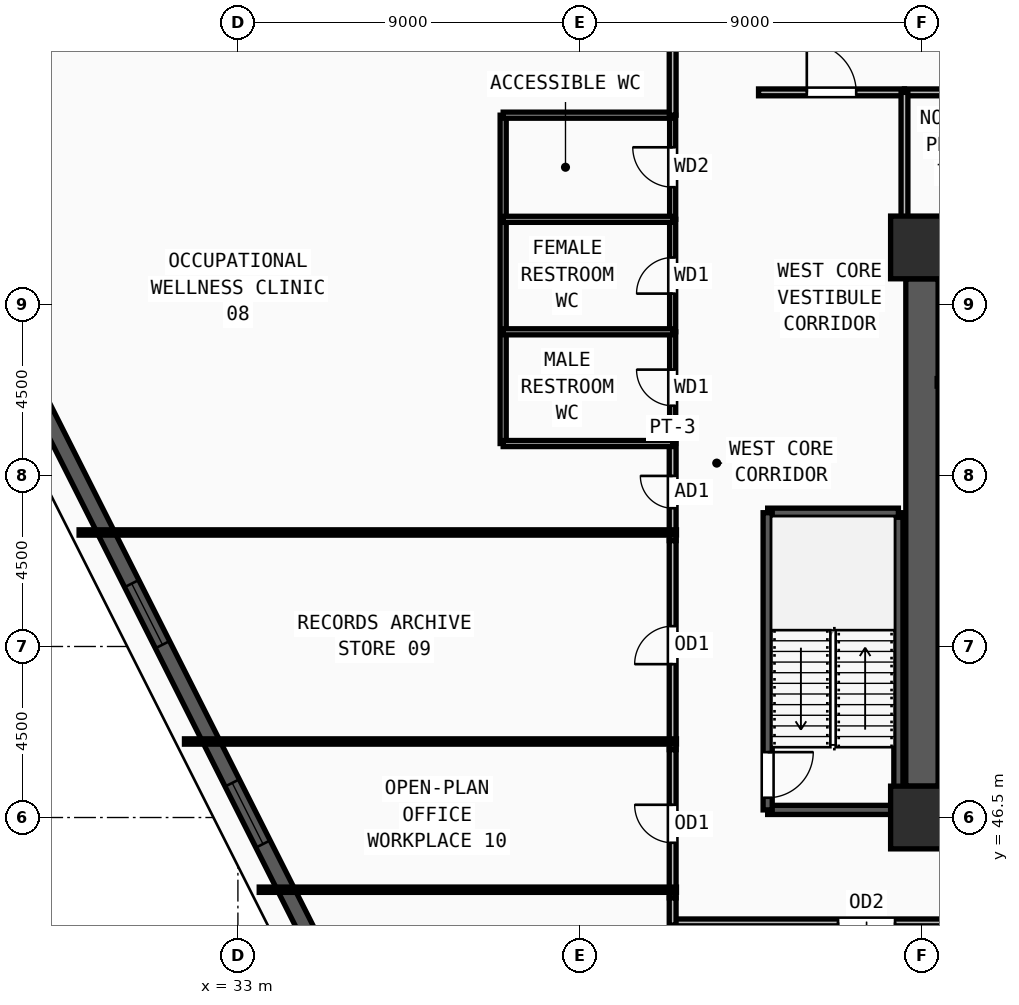
"""IFC4 building model, lengths in metres.
Left out: names, types, materials, properties, quantities, classifications, styles, units other than length and angle.
Written with IfcOpenShell. Run it as: python <this file> out.ifc"""

import sys

from ifc_helpers import new_model, si_unit, direction, frame, frame_2d, origin, origin_2d, place, context, subcontext, project, spatial, rectangle, extrude, source, transform, mapped, element, fill, save


model = new_model("IFC4")
c1 = context("Model", 3, precision=1e-05, world=origin(), true_north=direction((0.0, 1.0)))
c2 = subcontext(c1, "Body", "Model", "MODEL_VIEW")
j1 = project(units=[si_unit("LENGTHUNIT", "METRE"), si_unit("PLANEANGLEUNIT", "RADIAN")], contexts=[c1])
p1 = place(None, origin())
s1 = spatial("IfcSite", under=j1, at=p1, CompositionType="ELEMENT")
p2 = place(p1, origin())
s2 = spatial("IfcBuilding", under=s1, at=p2, CompositionType="ELEMENT")
p3 = place(p2, frame((0.0, 0.0, 74.25)))
s3 = spatial("IfcBuildingStorey", under=s2, at=p3, CompositionType="ELEMENT", Elevation=74.25)
m1 = source(origin(), c2, "Body", "SweptSolid", [
    extrude(rectangle(XDim=1.65, YDim=1.65, at=origin_2d()), origin(), (0.0, 0.0, 1.0), 3.75),
])
for number, where, z_axis, x_axis in (
    (1, (51.0, 46.5, 0.0), (0.0, 0.0, 1.0), (1.0, 0.0, 0.0)),
    (2, (51.0, 61.5, 0.0), (0.0, 0.0, 1.0), (1.0, 0.0, 0.0)),
):
    element("IfcColumn", number, at=place(p3, frame(where, z_axis=z_axis, x_axis=x_axis)), inside=s3, PredefinedType="COLUMN", context=c2, shape_type="MappedRepresentation", body=[
        mapped(m1, transform((0.0, 0.0, 0.0), x_axis=(1.0, 0.0, 0.0), y_axis=(0.0, 1.0, 0.0), z_axis=(0.0, 0.0, 1.0), scale=1.0)),
    ])
p4 = place(p3, frame((22.462, 68.01, 0.0), z_axis=(0.0, 0.0, 1.0), x_axis=(0.450259201953, -0.89289789509, 0.0)))
e3 = element("IfcWall", 3, at=p4, inside=s3, PredefinedType="SOLIDWALL", context=c2, shape_type="SweptSolid", body=[
    extrude(rectangle(XDim=33.094, YDim=0.42, at=frame_2d((16.547, 0.0))), origin(), (0.0, 0.0, 1.0), 3.57),
])
m2 = source(origin(), c2, "Body", "SweptSolid", [
    extrude(rectangle(XDim=1.8, YDim=1.95, at=frame_2d((0.9, 0.975))), frame((0.0, 0.22, 0.0), z_axis=(0.0, -1.0, 0.0), x_axis=(1.0, 0.0, 0.0)), (0.0, 0.0, 1.0), 0.44),
])
p5 = place(p4, frame((7.374, 0.0, 0.55)))
e4 = element("IfcOpeningElement", 4, at=p5, cuts=e3, PredefinedType="OPENING", context=c2, shape_type="MappedRepresentation", body=[
    mapped(m2, transform((0.0, 0.0, 0.0), x_axis=(1.0, 0.0, 0.0), y_axis=(0.0, 1.0, 0.0), z_axis=(0.0, 0.0, 1.0), scale=1.0)),
])
p6 = place(p4, frame((17.197, 0.0, 0.55)))
e5 = element("IfcOpeningElement", 5, at=p6, cuts=e3, PredefinedType="OPENING", context=c2, shape_type="MappedRepresentation", body=[
    mapped(m2, transform((0.0, 0.0, 0.0), x_axis=(1.0, 0.0, 0.0), y_axis=(0.0, 1.0, 0.0), z_axis=(0.0, 0.0, 1.0), scale=1.0)),
])
p7 = place(p4, frame((23.071, 0.0, 0.55)))
e6 = element("IfcOpeningElement", 6, at=p7, cuts=e3, PredefinedType="OPENING", context=c2, shape_type="MappedRepresentation", body=[
    mapped(m2, transform((0.0, 0.0, 0.0), x_axis=(1.0, 0.0, 0.0), y_axis=(0.0, 1.0, 0.0), z_axis=(0.0, 0.0, 1.0), scale=1.0)),
])
p8 = place(p3, frame((51.0, 47.325, 0.0), z_axis=(0.0, 0.0, 1.0), x_axis=(0.0, 1.0, 0.0)))
e7 = element("IfcWall", 7, at=p8, inside=s3, PredefinedType="SHEAR", context=c2, shape_type="SweptSolid", body=[
    extrude(rectangle(XDim=13.35, YDim=0.85, at=frame_2d((6.675, 0.0))), origin(), (0.0, 0.0, 1.0), 3.57),
])
p9 = place(p3, frame((46.94, 46.7, 0.0), z_axis=(0.0, 0.0, 1.0), x_axis=(1.0, 0.0, 0.0)))
e8 = element("IfcWall", 8, at=p9, inside=s3, PredefinedType="SOLIDWALL", context=c2, shape_type="SweptSolid", body=[
    extrude(rectangle(XDim=3.44, YDim=0.24, at=frame_2d((1.72, 0.0))), origin(), (0.0, 0.0, 1.0), 3.57),
])
p10 = place(p3, frame((50.38, 46.7, 0.0), z_axis=(0.0, 0.0, 1.0), x_axis=(0.0, 1.0, 0.0)))
e9 = element("IfcWall", 9, at=p10, inside=s3, PredefinedType="SOLIDWALL", context=c2, shape_type="SweptSolid", body=[
    extrude(rectangle(XDim=7.82, YDim=0.24, at=frame_2d((3.91, 0.0))), origin(), (0.0, 0.0, 1.0), 3.57),
])
p11 = place(p3, frame((50.38, 54.52, 0.0), z_axis=(0.0, 0.0, 1.0), x_axis=(-1.0, 0.0, 0.0)))
e10 = element("IfcWall", 10, at=p11, inside=s3, PredefinedType="SOLIDWALL", context=c2, shape_type="SweptSolid", body=[
    extrude(rectangle(XDim=3.44, YDim=0.24, at=frame_2d((1.72, 0.0))), origin(), (0.0, 0.0, 1.0), 3.57),
])
p12 = place(p3, frame((46.94, 54.52, 0.0), z_axis=(0.0, 0.0, 1.0), x_axis=(0.0, -1.0, 0.0)))
e11 = element("IfcWall", 11, at=p12, inside=s3, PredefinedType="SOLIDWALL", context=c2, shape_type="SweptSolid", body=[
    extrude(rectangle(XDim=7.82, YDim=0.24, at=frame_2d((3.91, 0.0))), origin(), (0.0, 0.0, 1.0), 3.57),
])
m3 = source(origin(), c2, "Body", "SweptSolid", [
    extrude(rectangle(XDim=1.2, YDim=2.2, at=frame_2d((0.6, 1.1))), frame((0.0, 0.13, 0.0), z_axis=(0.0, -1.0, 0.0), x_axis=(1.0, 0.0, 0.0)), (0.0, 0.0, 1.0), 0.26),
])
p13 = place(p12, frame((6.3, 0.0, 0.0)))
e12 = element("IfcOpeningElement", 12, at=p13, cuts=e11, PredefinedType="OPENING", context=c2, shape_type="MappedRepresentation", body=[
    mapped(m3, transform((0.0, 0.0, 0.0), x_axis=(1.0, 0.0, 0.0), y_axis=(0.0, 1.0, 0.0), z_axis=(0.0, 0.0, 1.0), scale=1.0)),
])
for number, where, z_axis, x_axis in (
    (13, (51.4, 57.95, 0.0), (0.0, 0.0, 1.0), (1.0, 0.0, 0.0)),
    (14, (53.8, 60.88, 0.0), (0.0, 0.0, 1.0), (-1.0, 0.0, 0.0)),
):
    element("IfcWall", number, at=place(p3, frame(where, z_axis=z_axis, x_axis=x_axis)), inside=s3, PredefinedType="SOLIDWALL", context=c2, shape_type="SweptSolid", body=[
        extrude(rectangle(XDim=2.4, YDim=0.2, at=frame_2d((1.2, 0.0))), origin(), (0.0, 0.0, 1.0), 3.57),
    ])
p14 = place(p3, frame((44.44, 56.34, 0.0), z_axis=(0.0, 0.0, 1.0), x_axis=(0.0, 1.0, 0.0)))
e15 = element("IfcWall", 15, at=p14, inside=s3, PredefinedType="PARTITIONING", context=c2, shape_type="SweptSolid", body=[
    extrude(rectangle(XDim=2.94, YDim=0.16, at=frame_2d((1.47, 0.0))), origin(), (0.0, 0.0, 1.0), 3.57),
])
m4 = source(origin(), c2, "Body", "SweptSolid", [
    extrude(rectangle(XDim=0.95, YDim=2.15, at=frame_2d((0.475, 1.075))), frame((0.0, 0.09, 0.0), z_axis=(0.0, -1.0, 0.0), x_axis=(1.0, 0.0, 0.0)), (0.0, 0.0, 1.0), 0.18),
])
p15 = place(p14, frame((0.995, 0.0, 0.0)))
e16 = element("IfcOpeningElement", 16, at=p15, cuts=e15, PredefinedType="OPENING", context=c2, shape_type="MappedRepresentation", body=[
    mapped(m4, transform((0.0, 0.0, 0.0), x_axis=(1.0, 0.0, 0.0), y_axis=(0.0, 1.0, 0.0), z_axis=(0.0, 0.0, 1.0), scale=1.0)),
])
p16 = place(p3, frame((44.44, 59.28, 0.0), z_axis=(0.0, 0.0, 1.0), x_axis=(0.0, 1.0, 0.0)))
e17 = element("IfcWall", 17, at=p16, inside=s3, PredefinedType="PARTITIONING", context=c2, shape_type="SweptSolid", body=[
    extrude(rectangle(XDim=2.96, YDim=0.16, at=frame_2d((1.48, 0.0))), origin(), (0.0, 0.0, 1.0), 3.57),
])
p17 = place(p16, frame((1.005, 0.0, 0.0)))
e18 = element("IfcOpeningElement", 18, at=p17, cuts=e17, PredefinedType="OPENING", context=c2, shape_type="MappedRepresentation", body=[
    mapped(m4, transform((0.0, 0.0, 0.0), x_axis=(1.0, 0.0, 0.0), y_axis=(0.0, 1.0, 0.0), z_axis=(0.0, 0.0, 1.0), scale=1.0)),
])
p18 = place(p3, frame((44.44, 62.24, 0.0), z_axis=(0.0, 0.0, 1.0), x_axis=(0.0, 1.0, 0.0)))
e19 = element("IfcWall", 19, at=p18, inside=s3, PredefinedType="PARTITIONING", context=c2, shape_type="SweptSolid", body=[
    extrude(rectangle(XDim=2.74, YDim=0.16, at=frame_2d((1.37, 0.0))), origin(), (0.0, 0.0, 1.0), 3.57),
])
m5 = source(origin(), c2, "Body", "SweptSolid", [
    extrude(rectangle(XDim=1.05, YDim=2.15, at=frame_2d((0.525, 1.075))), frame((0.0, 0.09, 0.0), z_axis=(0.0, -1.0, 0.0), x_axis=(1.0, 0.0, 0.0)), (0.0, 0.0, 1.0), 0.18),
])
p19 = place(p18, frame((0.845, 0.0, 0.0)))
e20 = element("IfcOpeningElement", 20, at=p19, cuts=e19, PredefinedType="OPENING", context=c2, shape_type="MappedRepresentation", body=[
    mapped(m5, transform((0.0, 0.0, 0.0), x_axis=(1.0, 0.0, 0.0), y_axis=(0.0, 1.0, 0.0), z_axis=(0.0, 0.0, 1.0), scale=1.0)),
])
p20 = place(p3, frame((50.54, 65.58, 0.0), z_axis=(0.0, 0.0, 1.0), x_axis=(1.0, 0.0, 0.0)))
e21 = element("IfcWall", 21, at=p20, inside=s3, PredefinedType="PARTITIONING", context=c2, shape_type="SweptSolid", body=[
    extrude(rectangle(XDim=3.87, YDim=0.18, at=frame_2d((1.935, 0.0))), origin(), (0.0, 0.0, 1.0), 3.57),
])
m6 = source(origin(), c2, "Body", "SweptSolid", [
    extrude(rectangle(XDim=1.0, YDim=2.2, at=frame_2d((0.5, 1.1))), frame((0.0, 0.1, 0.0), z_axis=(0.0, -1.0, 0.0), x_axis=(1.0, 0.0, 0.0)), (0.0, 0.0, 1.0), 0.2),
])
p21 = place(p20, frame((1.435, 0.0, 0.0)))
e22 = element("IfcOpeningElement", 22, at=p21, cuts=e21, PredefinedType="OPENING", context=c2, shape_type="MappedRepresentation", body=[
    mapped(m6, transform((0.0, 0.0, 0.0), x_axis=(1.0, 0.0, 0.0), y_axis=(0.0, 1.0, 0.0), z_axis=(0.0, 0.0, 1.0), scale=1.0)),
])
p22 = place(p3, frame((46.7, 65.58, 0.0), z_axis=(0.0, 0.0, 1.0), x_axis=(1.0, 0.0, 0.0)))
e23 = element("IfcWall", 23, at=p22, inside=s3, PredefinedType="PARTITIONING", context=c2, shape_type="SweptSolid", body=[
    extrude(rectangle(XDim=3.84, YDim=0.18, at=frame_2d((1.92, 0.0))), origin(), (0.0, 0.0, 1.0), 3.57),
])
m7 = source(origin(), c2, "Body", "SweptSolid", [
    extrude(rectangle(XDim=1.3, YDim=2.2, at=frame_2d((0.65, 1.1))), frame((0.0, 0.1, 0.0), z_axis=(0.0, -1.0, 0.0), x_axis=(1.0, 0.0, 0.0)), (0.0, 0.0, 1.0), 0.2),
])
p23 = place(p22, frame((1.27, 0.0, 0.0)))
e24 = element("IfcOpeningElement", 24, at=p23, cuts=e23, PredefinedType="OPENING", context=c2, shape_type="MappedRepresentation", body=[
    mapped(m7, transform((0.0, 0.0, 0.0), x_axis=(1.0, 0.0, 0.0), y_axis=(0.0, 1.0, 0.0), z_axis=(0.0, 0.0, 1.0), scale=1.0)),
])
p24 = place(p3, frame((44.44, 53.785, 0.0), z_axis=(0.0, 0.0, 1.0), x_axis=(0.0, 1.0, 0.0)))
e25 = element("IfcWall", 25, at=p24, inside=s3, PredefinedType="PARTITIONING", context=c2, shape_type="SweptSolid", body=[
    extrude(rectangle(XDim=2.555, YDim=0.18, at=frame_2d((1.278, 0.0))), origin(), (0.0, 0.0, 1.0), 3.57),
])
m8 = source(origin(), c2, "Body", "SweptSolid", [
    extrude(rectangle(XDim=0.85, YDim=2.1, at=frame_2d((0.425, 1.05))), frame((0.0, 0.1, 0.0), z_axis=(0.0, -1.0, 0.0), x_axis=(1.0, 0.0, 0.0)), (0.0, 0.0, 1.0), 0.2),
])
p25 = place(p24, frame((0.853, 0.0, 0.0)))
e26 = element("IfcOpeningElement", 26, at=p25, cuts=e25, PredefinedType="OPENING", context=c2, shape_type="MappedRepresentation", body=[
    mapped(m8, transform((0.0, 0.0, 0.0), x_axis=(1.0, 0.0, 0.0), y_axis=(0.0, 1.0, 0.0), z_axis=(0.0, 0.0, 1.0), scale=1.0)),
])
p26 = place(p3, frame((44.44, 48.285, 0.0), z_axis=(0.0, 0.0, 1.0), x_axis=(0.0, 1.0, 0.0)))
e27 = element("IfcWall", 27, at=p26, inside=s3, PredefinedType="PARTITIONING", context=c2, shape_type="SweptSolid", body=[
    extrude(rectangle(XDim=5.5, YDim=0.18, at=frame_2d((2.75, 0.0))), origin(), (0.0, 0.0, 1.0), 3.57),
])
p27 = place(p26, frame((2.25, 0.0, 0.0)))
e28 = element("IfcOpeningElement", 28, at=p27, cuts=e27, PredefinedType="OPENING", context=c2, shape_type="MappedRepresentation", body=[
    mapped(m6, transform((0.0, 0.0, 0.0), x_axis=(1.0, 0.0, 0.0), y_axis=(0.0, 1.0, 0.0), z_axis=(0.0, 0.0, 1.0), scale=1.0)),
])
p28 = place(p3, frame((44.44, 44.385, 0.0), z_axis=(0.0, 0.0, 1.0), x_axis=(0.0, 1.0, 0.0)))
e29 = element("IfcWall", 29, at=p28, inside=s3, PredefinedType="PARTITIONING", context=c2, shape_type="SweptSolid", body=[
    extrude(rectangle(XDim=3.9, YDim=0.18, at=frame_2d((1.95, 0.0))), origin(), (0.0, 0.0, 1.0), 3.57),
])
p29 = place(p28, frame((1.45, 0.0, 0.0)))
e30 = element("IfcOpeningElement", 30, at=p29, cuts=e29, PredefinedType="OPENING", context=c2, shape_type="MappedRepresentation", body=[
    mapped(m6, transform((0.0, 0.0, 0.0), x_axis=(1.0, 0.0, 0.0), y_axis=(0.0, 1.0, 0.0), z_axis=(0.0, 0.0, 1.0), scale=1.0)),
])
p30 = place(p3, frame((54.715, 43.74, 0.0), z_axis=(0.0, 0.0, 1.0), x_axis=(-1.0, 0.0, 0.0)))
e31 = element("IfcWall", 31, at=p30, inside=s3, PredefinedType="PARTITIONING", context=c2, shape_type="SweptSolid", body=[
    extrude(rectangle(XDim=10.345, YDim=0.18, at=frame_2d((5.172, 0.0))), origin(), (0.0, 0.0, 1.0), 3.57),
])
m9 = source(origin(), c2, "Body", "SweptSolid", [
    extrude(rectangle(XDim=1.5, YDim=2.2, at=frame_2d((0.75, 1.1))), frame((0.0, 0.1, 0.0), z_axis=(0.0, -1.0, 0.0), x_axis=(1.0, 0.0, 0.0)), (0.0, 0.0, 1.0), 0.2),
])
p31 = place(p30, frame((4.423, 0.0, 0.0)))
e32 = element("IfcOpeningElement", 32, at=p31, cuts=e31, PredefinedType="OPENING", context=c2, shape_type="MappedRepresentation", body=[
    mapped(m9, transform((0.0, 0.0, 0.0), x_axis=(1.0, 0.0, 0.0), y_axis=(0.0, 1.0, 0.0), z_axis=(0.0, 0.0, 1.0), scale=1.0)),
])
p32 = place(p3, frame((39.98, 56.34, 0.0), z_axis=(0.0, 0.0, 1.0), x_axis=(0.0, 1.0, 0.0)))
e33 = element("IfcWall", 33, at=p32, inside=s3, PredefinedType="PARTITIONING", context=c2, shape_type="SweptSolid", body=[
    extrude(rectangle(XDim=8.64, YDim=0.16, at=frame_2d((4.32, 0.0))), origin(), (0.0, 0.0, 1.0), 3.57),
])
for number, where, z_axis, x_axis in (
    (34, (39.98, 56.34, 0.0), (0.0, 0.0, 1.0), (1.0, 0.0, 0.0)),
    (35, (39.98, 59.28, 0.0), (0.0, 0.0, 1.0), (1.0, 0.0, 0.0)),
    (36, (39.98, 62.24, 0.0), (0.0, 0.0, 1.0), (1.0, 0.0, 0.0)),
    (37, (39.98, 64.98, 0.0), (0.0, 0.0, 1.0), (1.0, 0.0, 0.0)),
):
    element("IfcWall", number, at=place(p3, frame(where, z_axis=z_axis, x_axis=x_axis)), inside=s3, PredefinedType="PARTITIONING", context=c2, shape_type="SweptSolid", body=[
        extrude(rectangle(XDim=4.46, YDim=0.16, at=frame_2d((2.23, 0.0))), origin(), (0.0, 0.0, 1.0), 3.57),
    ])
p33 = place(p3, frame((50.54, 61.95, 0.0), z_axis=(0.0, 0.0, 1.0), x_axis=(0.0, 1.0, 0.0)))
e38 = element("IfcWall", 38, at=p33, inside=s3, PredefinedType="PARTITIONING", context=c2, shape_type="SweptSolid", body=[
    extrude(rectangle(XDim=3.63, YDim=0.18, at=frame_2d((1.815, 0.0))), origin(), (0.0, 0.0, 1.0), 3.57),
])
p34 = place(p3, frame((44.44, 64.98, 0.0), z_axis=(0.0, 0.0, 1.0), x_axis=(0.0, 1.0, 0.0)))
e39 = element("IfcWall", 39, at=p34, inside=s3, PredefinedType="PARTITIONING", context=c2, shape_type="SweptSolid", body=[
    extrude(rectangle(XDim=1.805, YDim=0.18, at=frame_2d((0.902, 0.0))), origin(), (0.0, 0.0, 1.0), 3.57),
])
p35 = place(p3, frame((44.44, 43.67, 0.0), z_axis=(0.0, 0.0, 1.0), x_axis=(0.0, 1.0, 0.0)))
e40 = element("IfcWall", 40, at=p35, inside=s3, PredefinedType="PARTITIONING", context=c2, shape_type="SweptSolid", body=[
    extrude(rectangle(XDim=0.715, YDim=0.18, at=frame_2d((0.357, 0.0))), origin(), (0.0, 0.0, 1.0), 3.57),
])
p36 = place(p3, frame((44.54, 44.6, 0.0), z_axis=(0.0, 0.0, 1.0), x_axis=(-1.0, 0.0, 0.0)))
e41 = element("IfcWall", 41, at=p36, inside=s3, PredefinedType="PARTITIONING", context=c2, shape_type="SweptSolid", body=[
    extrude(rectangle(XDim=10.979, YDim=0.14, at=frame_2d((5.49, 0.0))), origin(), (0.0, 0.0, 1.0), 3.57),
])
p37 = place(p3, frame((44.54, 48.5, 0.0), z_axis=(0.0, 0.0, 1.0), x_axis=(-1.0, 0.0, 0.0)))
e42 = element("IfcWall", 42, at=p37, inside=s3, PredefinedType="PARTITIONING", context=c2, shape_type="SweptSolid", body=[
    extrude(rectangle(XDim=12.946, YDim=0.14, at=frame_2d((6.473, 0.0))), origin(), (0.0, 0.0, 1.0), 3.57),
])
p38 = place(p3, frame((44.54, 54.0, 0.0), z_axis=(0.0, 0.0, 1.0), x_axis=(-1.0, 0.0, 0.0)))
e43 = element("IfcWall", 43, at=p38, inside=s3, PredefinedType="PARTITIONING", context=c2, shape_type="SweptSolid", body=[
    extrude(rectangle(XDim=15.719, YDim=0.14, at=frame_2d((7.859, 0.0))), origin(), (0.0, 0.0, 1.0), 3.57),
])
m10 = source(origin(), c2, "Body", "SweptSolid", [
    extrude(rectangle(XDim=1.8, YDim=1.95, at=frame_2d((0.9, 0.975))), frame((0.0, 0.03, 0.0), z_axis=(0.0, -1.0, 0.0), x_axis=(1.0, 0.0, 0.0)), (0.0, 0.0, 1.0), 0.06),
])
p39 = place(p6, origin())
e44 = element("IfcWindow", 44, at=p39, inside=s3, PartitioningType="DOUBLE_PANEL_VERTICAL", PredefinedType="WINDOW", context=c2, shape_type="MappedRepresentation", body=[
    mapped(m10, transform((0.0, 0.0, 0.0), x_axis=(1.0, 0.0, 0.0), y_axis=(0.0, 1.0, 0.0), z_axis=(0.0, 0.0, 1.0), scale=1.0)),
])
fill(e5, e44)
p40 = place(p7, origin())
e45 = element("IfcWindow", 45, at=p40, inside=s3, PartitioningType="DOUBLE_PANEL_VERTICAL", PredefinedType="WINDOW", context=c2, shape_type="MappedRepresentation", body=[
    mapped(m10, transform((0.0, 0.0, 0.0), x_axis=(1.0, 0.0, 0.0), y_axis=(0.0, 1.0, 0.0), z_axis=(0.0, 0.0, 1.0), scale=1.0)),
])
fill(e6, e45)
m11 = source(origin(), c2, "Body", "SweptSolid", [
    extrude(rectangle(XDim=1.2, YDim=2.2, at=frame_2d((0.6, 1.1))), frame((0.0, 0.025, 0.0), z_axis=(0.0, -1.0, 0.0), x_axis=(1.0, 0.0, 0.0)), (0.0, 0.0, 1.0), 0.05),
])
p41 = place(p13, origin())
e46 = element("IfcDoor", 46, at=p41, inside=s3, OperationType="SINGLE_SWING_LEFT", PredefinedType="DOOR", context=c2, shape_type="MappedRepresentation", body=[
    mapped(m11, transform((0.0, 0.0, 0.0), x_axis=(1.0, 0.0, 0.0), y_axis=(0.0, 1.0, 0.0), z_axis=(0.0, 0.0, 1.0), scale=1.0)),
])
fill(e12, e46)
m12 = source(origin(), c2, "Body", "SweptSolid", [
    extrude(rectangle(XDim=0.95, YDim=2.15, at=frame_2d((0.475, 1.075))), frame((0.0, 0.025, 0.0), z_axis=(0.0, -1.0, 0.0), x_axis=(1.0, 0.0, 0.0)), (0.0, 0.0, 1.0), 0.05),
])
p42 = place(p15, origin())
e47 = element("IfcDoor", 47, at=p42, inside=s3, OperationType="SINGLE_SWING_RIGHT", PredefinedType="DOOR", context=c2, shape_type="MappedRepresentation", body=[
    mapped(m12, transform((0.0, 0.0, 0.0), x_axis=(1.0, 0.0, 0.0), y_axis=(0.0, 1.0, 0.0), z_axis=(0.0, 0.0, 1.0), scale=1.0)),
])
fill(e16, e47)
p43 = place(p17, origin())
e48 = element("IfcDoor", 48, at=p43, inside=s3, OperationType="SINGLE_SWING_LEFT", PredefinedType="DOOR", context=c2, shape_type="MappedRepresentation", body=[
    mapped(m12, transform((0.0, 0.0, 0.0), x_axis=(1.0, 0.0, 0.0), y_axis=(0.0, 1.0, 0.0), z_axis=(0.0, 0.0, 1.0), scale=1.0)),
])
fill(e18, e48)
m13 = source(origin(), c2, "Body", "SweptSolid", [
    extrude(rectangle(XDim=1.05, YDim=2.15, at=frame_2d((0.525, 1.075))), frame((0.0, 0.025, 0.0), z_axis=(0.0, -1.0, 0.0), x_axis=(1.0, 0.0, 0.0)), (0.0, 0.0, 1.0), 0.05),
])
p44 = place(p19, origin())
e49 = element("IfcDoor", 49, at=p44, inside=s3, OperationType="SINGLE_SWING_RIGHT", PredefinedType="DOOR", context=c2, shape_type="MappedRepresentation", body=[
    mapped(m13, transform((0.0, 0.0, 0.0), x_axis=(1.0, 0.0, 0.0), y_axis=(0.0, 1.0, 0.0), z_axis=(0.0, 0.0, 1.0), scale=1.0)),
])
fill(e20, e49)
m14 = source(origin(), c2, "Body", "SweptSolid", [
    extrude(rectangle(XDim=1.3, YDim=2.2, at=frame_2d((0.65, 1.1))), frame((0.0, 0.025, 0.0), z_axis=(0.0, -1.0, 0.0), x_axis=(1.0, 0.0, 0.0)), (0.0, 0.0, 1.0), 0.05),
])
p45 = place(p23, origin())
e50 = element("IfcDoor", 50, at=p45, inside=s3, OperationType="SINGLE_SWING_LEFT", PredefinedType="DOOR", context=c2, shape_type="MappedRepresentation", body=[
    mapped(m14, transform((0.0, 0.0, 0.0), x_axis=(1.0, 0.0, 0.0), y_axis=(0.0, 1.0, 0.0), z_axis=(0.0, 0.0, 1.0), scale=1.0)),
])
fill(e24, e50)
m15 = source(origin(), c2, "Body", "SweptSolid", [
    extrude(rectangle(XDim=0.85, YDim=2.1, at=frame_2d((0.425, 1.05))), frame((0.0, 0.025, 0.0), z_axis=(0.0, -1.0, 0.0), x_axis=(1.0, 0.0, 0.0)), (0.0, 0.0, 1.0), 0.05),
])
p46 = place(p25, origin())
e51 = element("IfcDoor", 51, at=p46, inside=s3, OperationType="SINGLE_SWING_RIGHT", PredefinedType="DOOR", context=c2, shape_type="MappedRepresentation", body=[
    mapped(m15, transform((0.0, 0.0, 0.0), x_axis=(1.0, 0.0, 0.0), y_axis=(0.0, 1.0, 0.0), z_axis=(0.0, 0.0, 1.0), scale=1.0)),
])
fill(e26, e51)
m16 = source(origin(), c2, "Body", "SweptSolid", [
    extrude(rectangle(XDim=1.0, YDim=2.2, at=frame_2d((0.5, 1.1))), frame((0.0, 0.025, 0.0), z_axis=(0.0, -1.0, 0.0), x_axis=(1.0, 0.0, 0.0)), (0.0, 0.0, 1.0), 0.05),
])
p47 = place(p27, origin())
e52 = element("IfcDoor", 52, at=p47, inside=s3, OperationType="SINGLE_SWING_LEFT", PredefinedType="DOOR", context=c2, shape_type="MappedRepresentation", body=[
    mapped(m16, transform((0.0, 0.0, 0.0), x_axis=(1.0, 0.0, 0.0), y_axis=(0.0, 1.0, 0.0), z_axis=(0.0, 0.0, 1.0), scale=1.0)),
])
fill(e28, e52)
p48 = place(p29, origin())
e53 = element("IfcDoor", 53, at=p48, inside=s3, OperationType="SINGLE_SWING_RIGHT", PredefinedType="DOOR", context=c2, shape_type="MappedRepresentation", body=[
    mapped(m16, transform((0.0, 0.0, 0.0), x_axis=(1.0, 0.0, 0.0), y_axis=(0.0, 1.0, 0.0), z_axis=(0.0, 0.0, 1.0), scale=1.0)),
])
fill(e30, e53)
m17 = source(origin(), c2, "Body", "SweptSolid", [
    extrude(rectangle(XDim=1.5, YDim=2.2, at=frame_2d((0.75, 1.1))), frame((0.0, 0.025, 0.0), z_axis=(0.0, -1.0, 0.0), x_axis=(1.0, 0.0, 0.0)), (0.0, 0.0, 1.0), 0.05),
])
p49 = place(p31, origin())
e54 = element("IfcDoor", 54, at=p49, inside=s3, OperationType="DOUBLE_DOOR_SINGLE_SWING", PredefinedType="DOOR", context=c2, shape_type="MappedRepresentation", body=[
    mapped(m17, transform((0.0, 0.0, 0.0), x_axis=(1.0, 0.0, 0.0), y_axis=(0.0, 1.0, 0.0), z_axis=(0.0, 0.0, 1.0), scale=1.0)),
])
fill(e32, e54)
save(model, sys.argv[1])
